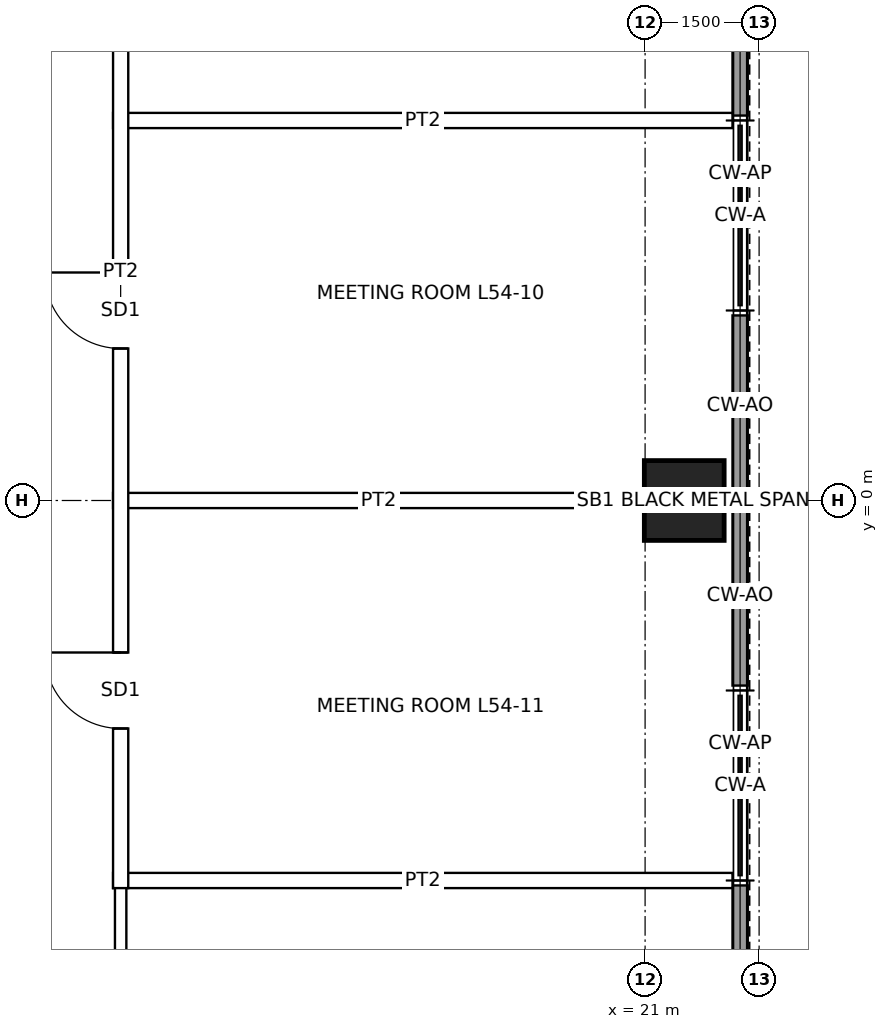
"""IFC4 building model, lengths in metres.
Left out: names, types, materials, properties, quantities, classifications, styles, units other than length and angle.
Written with IfcOpenShell. Run it as: python <this file> out.ifc"""

import sys

from ifc_helpers import new_model, si_unit, direction, frame, frame_2d, origin, origin_2d, place, context, subcontext, project, spatial, rectangle, hollow_rectangle, extrude, element, fill, save


model = new_model("IFC4")
c1 = context("Model", 3, precision=1e-05, world=origin(), true_north=direction((0.0, 1.0)))
c2 = subcontext(c1, "Body", "Model", "MODEL_VIEW")
j1 = project(units=[si_unit("LENGTHUNIT", "METRE"), si_unit("PLANEANGLEUNIT", "RADIAN")], contexts=[c1])
p1 = place(None, origin())
s1 = spatial("IfcSite", under=j1, at=p1, CompositionType="ELEMENT")
p2 = place(p1, origin())
s2 = spatial("IfcBuilding", under=s1, at=p2, CompositionType="ELEMENT")
p3 = place(p2, frame((0.0, 0.0, 249.9)))
s3 = spatial("IfcBuildingStorey", under=s2, at=p3, CompositionType="ELEMENT", Elevation=249.9)
p4 = place(p3, frame((21.515, 0.0, 0.0), z_axis=(0.0, 0.0, 1.0), x_axis=(1.0, 0.0, 0.0)))
e1 = element("IfcColumn", 1, at=p4, inside=s3, PredefinedType="COLUMN", context=c2, shape_type="SweptSolid", body=[
    extrude(hollow_rectangle(XDim=1.05, YDim=1.05, WallThickness=0.07, at=origin_2d()), origin(), (0.0, 0.0, 1.0), 4.0),
])
for number, where, z_axis, x_axis in (
    (2, (22.25, 7.435, 0.0), (0.0, 0.0, 1.0), (0.0, -1.0, 0.0)),
    (3, (22.25, 2.435, 0.0), (0.0, 0.0, 1.0), (0.0, -1.0, 0.0)),
    (4, (22.25, -0.065, 0.0), (0.0, 0.0, 1.0), (0.0, -1.0, 0.0)),
    (5, (22.25, -5.065, 0.0), (0.0, 0.0, 1.0), (0.0, -1.0, 0.0)),
):
    element("IfcWall", number, at=place(p3, frame(where, z_axis=z_axis, x_axis=x_axis)), inside=s3, PredefinedType="SOLIDWALL", context=c2, shape_type="SweptSolid", body=[
        extrude(rectangle(XDim=2.37, YDim=0.2, at=frame_2d((1.185, 0.0))), origin(), (0.0, 0.0, 1.0), 3.75),
    ])
p5 = place(p3, frame((14.0, -5.0, 0.0), z_axis=(0.0, 0.0, 1.0), x_axis=(1.0, 0.0, 0.0)))
e6 = element("IfcWall", 6, at=p5, inside=s3, PredefinedType="PARTITIONING", context=c2, shape_type="SweptSolid", body=[
    extrude(rectangle(XDim=8.15, YDim=0.2, at=frame_2d((4.075, 0.0))), origin(), (0.0, 0.0, 1.0), 3.75),
])
p6 = place(p3, frame((14.0, 0.0, 0.0), z_axis=(0.0, 0.0, 1.0), x_axis=(1.0, 0.0, 0.0)))
e7 = element("IfcWall", 7, at=p6, inside=s3, PredefinedType="PARTITIONING", context=c2, shape_type="SweptSolid", body=[
    extrude(rectangle(XDim=6.99, YDim=0.2, at=frame_2d((3.495, 0.0))), origin(), (0.0, 0.0, 1.0), 3.75),
])
p7 = place(p3, frame((14.0, 5.0, 0.0), z_axis=(0.0, 0.0, 1.0), x_axis=(1.0, 0.0, 0.0)))
e8 = element("IfcWall", 8, at=p7, inside=s3, PredefinedType="PARTITIONING", context=c2, shape_type="SweptSolid", body=[
    extrude(rectangle(XDim=8.15, YDim=0.2, at=frame_2d((4.075, 0.0))), origin(), (0.0, 0.0, 1.0), 3.75),
])
p8 = place(p3, frame((14.1, -14.175, 0.0), z_axis=(0.0, 0.0, 1.0), x_axis=(0.0, 1.0, 0.0)))
e9 = element("IfcWall", 9, at=p8, inside=s3, PredefinedType="PARTITIONING", context=c2, shape_type="SweptSolid", body=[
    extrude(rectangle(XDim=9.25, YDim=0.15, at=frame_2d((4.625, 0.0))), origin(), (0.0, 0.0, 1.0), 3.75),
])
p9 = place(p8, frame((6.217, 0.0, 0.0)))
e10 = element("IfcOpeningElement", 10, at=p9, cuts=e9, PredefinedType="OPENING", context=c2, shape_type="SweptSolid", body=[
    extrude(rectangle(XDim=1.0, YDim=2.4, at=frame_2d((0.5, 1.2))), frame((0.0, 0.085, 0.0), z_axis=(0.0, -1.0, 0.0), x_axis=(1.0, 0.0, 0.0)), (0.0, 0.0, 1.0), 0.17),
])
p10 = place(p3, frame((14.1, -5.1, 0.0), z_axis=(0.0, 0.0, 1.0), x_axis=(0.0, 1.0, 0.0)))
e11 = element("IfcWall", 11, at=p10, inside=s3, PredefinedType="PARTITIONING", context=c2, shape_type="SweptSolid", body=[
    extrude(rectangle(XDim=15.117, YDim=0.2, at=frame_2d((7.559, 0.0))), origin(), (0.0, 0.0, 1.0), 3.75),
])
p11 = place(p10, frame((12.059, 0.0, 0.0)))
e12 = element("IfcOpeningElement", 12, at=p11, cuts=e11, PredefinedType="OPENING", context=c2, shape_type="SweptSolid", body=[
    extrude(rectangle(XDim=1.0, YDim=2.4, at=frame_2d((0.5, 1.2))), frame((0.0, 0.11, 0.0), z_axis=(0.0, -1.0, 0.0), x_axis=(1.0, 0.0, 0.0)), (0.0, 0.0, 1.0), 0.22),
])
p12 = place(p10, frame((7.1, 0.0, 0.0)))
e13 = element("IfcOpeningElement", 13, at=p12, cuts=e11, PredefinedType="OPENING", context=c2, shape_type="SweptSolid", body=[
    extrude(rectangle(XDim=1.0, YDim=2.4, at=frame_2d((0.5, 1.2))), frame((0.0, 0.11, 0.0), z_axis=(0.0, -1.0, 0.0), x_axis=(1.0, 0.0, 0.0)), (0.0, 0.0, 1.0), 0.22),
])
p13 = place(p10, frame((2.1, 0.0, 0.0)))
e14 = element("IfcOpeningElement", 14, at=p13, cuts=e11, PredefinedType="OPENING", context=c2, shape_type="SweptSolid", body=[
    extrude(rectangle(XDim=1.0, YDim=2.4, at=frame_2d((0.5, 1.2))), frame((0.0, 0.11, 0.0), z_axis=(0.0, -1.0, 0.0), x_axis=(1.0, 0.0, 0.0)), (0.0, 0.0, 1.0), 0.22),
])
p14 = place(p12, origin())
e15 = element("IfcDoor", 15, at=p14, inside=s3, OperationType="SINGLE_SWING_RIGHT", PredefinedType="DOOR", context=c2, shape_type="SweptSolid", body=[
    extrude(rectangle(XDim=1.0, YDim=2.4, at=frame_2d((0.5, 1.2))), frame((0.0, 0.025, 0.0), z_axis=(0.0, -1.0, 0.0), x_axis=(1.0, 0.0, 0.0)), (0.0, 0.0, 1.0), 0.05),
])
fill(e13, e15)
p15 = place(p13, origin())
e16 = element("IfcDoor", 16, at=p15, inside=s3, OperationType="SINGLE_SWING_RIGHT", PredefinedType="DOOR", context=c2, shape_type="SweptSolid", body=[
    extrude(rectangle(XDim=1.0, YDim=2.4, at=frame_2d((0.5, 1.2))), frame((0.0, 0.025, 0.0), z_axis=(0.0, -1.0, 0.0), x_axis=(1.0, 0.0, 0.0)), (0.0, 0.0, 1.0), 0.05),
])
fill(e14, e16)
save(model, sys.argv[1])
